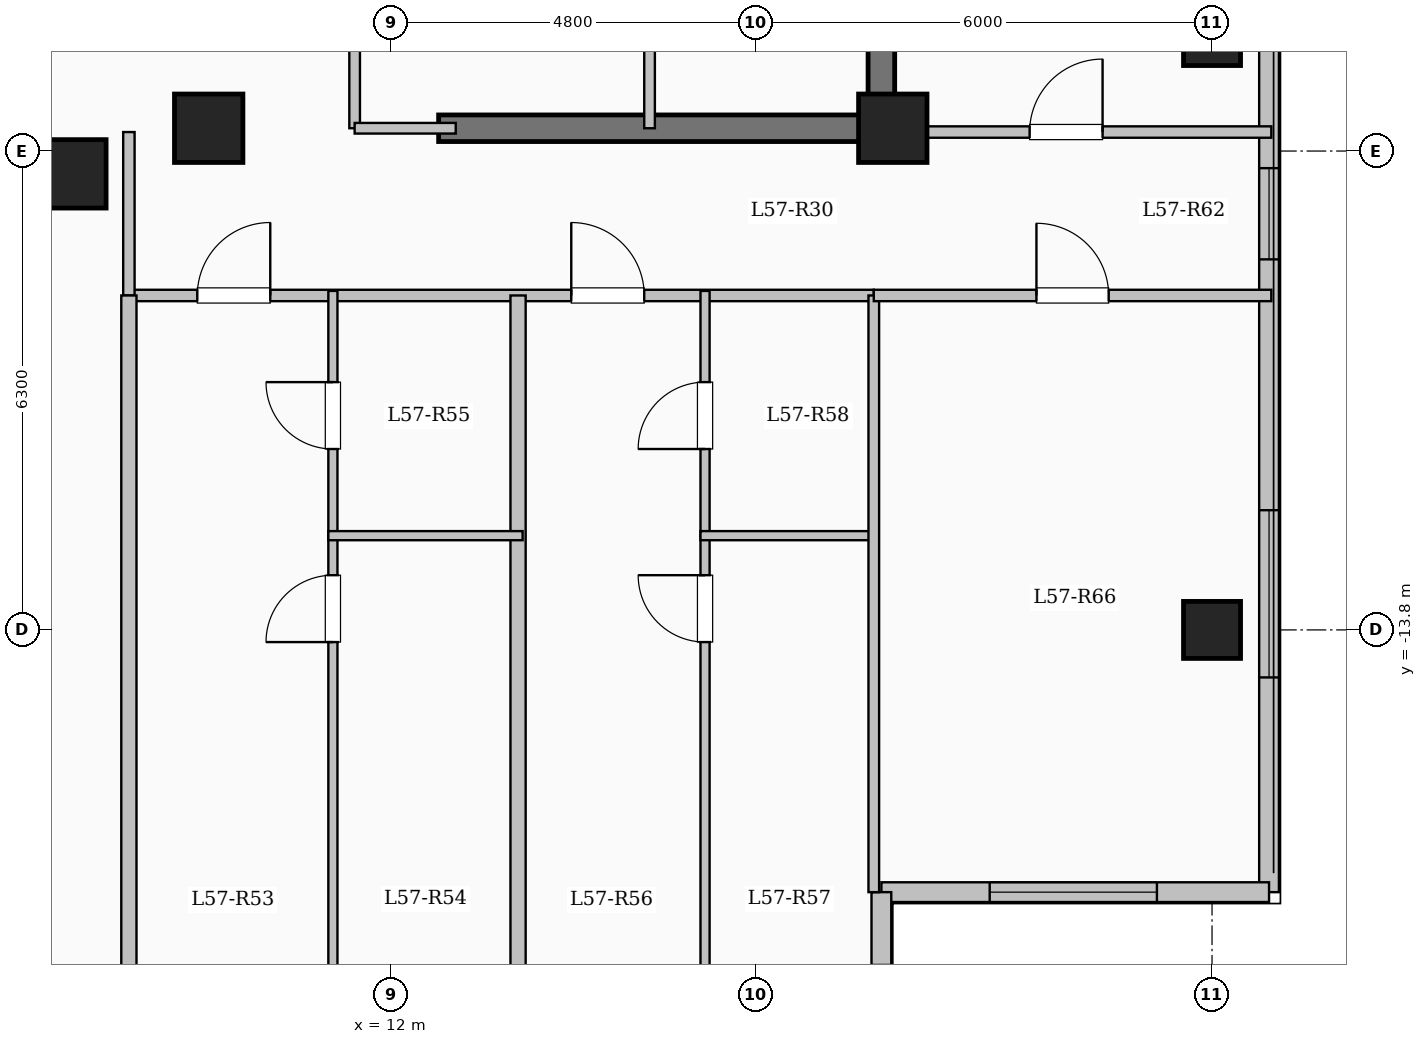
"""IFC4 building model, lengths in metres.
Left out: names, types, materials, properties, quantities, classifications, styles, units other than length and angle.
Written with IfcOpenShell. Run it as: python <this file> out.ifc"""

import sys

from ifc_helpers import new_model, si_unit, direction, frame, frame_2d, origin, origin_2d, place, context, subcontext, project, spatial, rectangle, extrude, element, fill, save


model = new_model("IFC4")
c1 = context("Model", 3, precision=1e-05, world=origin(), true_north=direction((0.0, 1.0)))
c2 = subcontext(c1, "Body", "Model", "MODEL_VIEW")
j1 = project(units=[si_unit("LENGTHUNIT", "METRE"), si_unit("PLANEANGLEUNIT", "RADIAN")], contexts=[c1])
p1 = place(None, origin())
s1 = spatial("IfcSite", under=j1, at=p1, CompositionType="ELEMENT")
p2 = place(p1, origin())
s2 = spatial("IfcBuilding", under=s1, at=p2, CompositionType="ELEMENT")
p3 = place(p2, frame((0.0, 0.0, 210.35)))
s3 = spatial("IfcBuildingStorey", under=s2, at=p3, CompositionType="ELEMENT", Elevation=210.35)
for number, where, z_axis, x_axis in (
    (1, (7.8, -7.8, 0.0), (0.0, 0.0, 1.0), (1.0, 0.0, 0.0)),
    (2, (9.6, -7.2, 0.0), (0.0, 0.0, 1.0), (1.0, 0.0, 0.0)),
    (3, (18.6, -7.2, 0.0), (0.0, 0.0, 1.0), (1.0, 0.0, 0.0)),
):
    element("IfcColumn", number, at=place(p3, frame(where, z_axis=z_axis, x_axis=x_axis)), inside=s3, PredefinedType="COLUMN", context=c2, shape_type="SweptSolid", body=[
        extrude(rectangle(XDim=0.9, YDim=0.9, at=origin_2d()), origin(), (0.0, 0.0, 1.0), 3.35),
    ])
for number, where, z_axis, x_axis in (
    (4, (22.8, -13.8, 0.0), (0.0, 0.0, 1.0), (1.0, 0.0, 0.0)),
    (5, (22.8, -6.0, 0.0), (0.0, 0.0, 1.0), (1.0, 0.0, 0.0)),
):
    element("IfcColumn", number, at=place(p3, frame(where, z_axis=z_axis, x_axis=x_axis)), inside=s3, PredefinedType="COLUMN", context=c2, shape_type="SweptSolid", body=[
        extrude(rectangle(XDim=0.75, YDim=0.75, at=origin_2d()), origin(), (0.0, 0.0, 1.0), 3.35),
    ])
p4 = place(p3, frame((23.55, 17.25, 0.0), z_axis=(0.0, 0.0, 1.0), x_axis=(0.0, -1.0, 0.0)))
e6 = element("IfcWall", 6, at=p4, inside=s3, PredefinedType="SOLIDWALL", context=c2, shape_type="SweptSolid", body=[
    extrude(rectangle(XDim=34.5, YDim=0.26, at=frame_2d((17.25, 0.0))), origin(), (0.0, 0.0, 1.0), 3.1),
])
p5 = place(p4, frame((1.375, 0.0, 0.9)))
e7 = element("IfcOpeningElement", 7, at=p5, cuts=e6, PredefinedType="OPENING", context=c2, shape_type="SweptSolid", body=[
    extrude(rectangle(XDim=2.0, YDim=1.7, at=frame_2d((1.0, 0.85))), frame((0.0, 0.14, 0.0), z_axis=(0.0, -1.0, 0.0), x_axis=(1.0, 0.0, 0.0)), (0.0, 0.0, 1.0), 0.28),
])
p6 = place(p4, frame((5.125, 0.0, 0.95)))
e8 = element("IfcOpeningElement", 8, at=p6, cuts=e6, PredefinedType="OPENING", context=c2, shape_type="SweptSolid", body=[
    extrude(rectangle(XDim=1.0, YDim=1.5, at=frame_2d((0.5, 0.75))), frame((0.0, 0.14, 0.0), z_axis=(0.0, -1.0, 0.0), x_axis=(1.0, 0.0, 0.0)), (0.0, 0.0, 1.0), 0.28),
])
p7 = place(p4, frame((8.375, 0.0, 0.9)))
e9 = element("IfcOpeningElement", 9, at=p7, cuts=e6, PredefinedType="OPENING", context=c2, shape_type="SweptSolid", body=[
    extrude(rectangle(XDim=2.0, YDim=1.7, at=frame_2d((1.0, 0.85))), frame((0.0, 0.14, 0.0), z_axis=(0.0, -1.0, 0.0), x_axis=(1.0, 0.0, 0.0)), (0.0, 0.0, 1.0), 0.28),
])
p8 = place(p4, frame((13.2, 0.0, 0.9)))
e10 = element("IfcOpeningElement", 10, at=p8, cuts=e6, PredefinedType="OPENING", context=c2, shape_type="SweptSolid", body=[
    extrude(rectangle(XDim=1.65, YDim=1.6, at=frame_2d((0.825, 0.8))), frame((0.0, 0.14, 0.0), z_axis=(0.0, -1.0, 0.0), x_axis=(1.0, 0.0, 0.0)), (0.0, 0.0, 1.0), 0.28),
])
p9 = place(p4, frame((19.05, 0.0, 0.9)))
e11 = element("IfcOpeningElement", 11, at=p9, cuts=e6, PredefinedType="OPENING", context=c2, shape_type="SweptSolid", body=[
    extrude(rectangle(XDim=2.2, YDim=1.75, at=frame_2d((1.1, 0.875))), frame((0.0, 0.14, 0.0), z_axis=(0.0, -1.0, 0.0), x_axis=(1.0, 0.0, 0.0)), (0.0, 0.0, 1.0), 0.28),
])
p10 = place(p4, frame((24.975, 0.0, 0.95)))
e12 = element("IfcOpeningElement", 12, at=p10, cuts=e6, PredefinedType="OPENING", context=c2, shape_type="SweptSolid", body=[
    extrude(rectangle(XDim=1.2, YDim=1.5, at=frame_2d((0.6, 0.75))), frame((0.0, 0.14, 0.0), z_axis=(0.0, -1.0, 0.0), x_axis=(1.0, 0.0, 0.0)), (0.0, 0.0, 1.0), 0.28),
])
p11 = place(p4, frame((29.475, 0.0, 0.9)))
e13 = element("IfcOpeningElement", 13, at=p11, cuts=e6, PredefinedType="OPENING", context=c2, shape_type="SweptSolid", body=[
    extrude(rectangle(XDim=2.2, YDim=1.75, at=frame_2d((1.1, 0.875))), frame((0.0, 0.14, 0.0), z_axis=(0.0, -1.0, 0.0), x_axis=(1.0, 0.0, 0.0)), (0.0, 0.0, 1.0), 0.28),
])
p12 = place(p3, frame((23.55, -17.25, 0.0), z_axis=(0.0, 0.0, 1.0), x_axis=(-1.0, 0.0, 0.0)))
e14 = element("IfcWall", 14, at=p12, inside=s3, PredefinedType="SOLIDWALL", context=c2, shape_type="SweptSolid", body=[
    extrude(rectangle(XDim=5.1, YDim=0.26, at=frame_2d((2.55, 0.0))), origin(), (0.0, 0.0, 1.0), 3.1),
])
p13 = place(p12, frame((1.475, 0.0, 0.9)))
e15 = element("IfcOpeningElement", 15, at=p13, cuts=e14, PredefinedType="OPENING", context=c2, shape_type="SweptSolid", body=[
    extrude(rectangle(XDim=2.2, YDim=1.75, at=frame_2d((1.1, 0.875))), frame((0.0, 0.14, 0.0), z_axis=(0.0, -1.0, 0.0), x_axis=(1.0, 0.0, 0.0)), (0.0, 0.0, 1.0), 0.28),
])
p14 = place(p3, frame((18.45, -17.25, 0.0), z_axis=(0.0, 0.0, 1.0), x_axis=(0.0, -1.0, 0.0)))
e16 = element("IfcWall", 16, at=p14, inside=s3, PredefinedType="SOLIDWALL", context=c2, shape_type="SweptSolid", body=[
    extrude(rectangle(XDim=3.6, YDim=0.26, at=frame_2d((1.8, 0.0))), origin(), (0.0, 0.0, 1.0), 3.1),
])
p15 = place(p14, frame((0.958, 0.0, 0.9)))
e17 = element("IfcOpeningElement", 17, at=p15, cuts=e16, PredefinedType="OPENING", context=c2, shape_type="SweptSolid", body=[
    extrude(rectangle(XDim=1.65, YDim=1.6, at=frame_2d((0.825, 0.8))), frame((0.0, 0.14, 0.0), z_axis=(0.0, -1.0, 0.0), x_axis=(1.0, 0.0, 0.0)), (0.0, 0.0, 1.0), 0.28),
])
p16 = place(p3, frame((18.45, -7.375, 0.0), z_axis=(0.0, 0.0, 1.0), x_axis=(0.0, 1.0, 0.0)))
e18 = element("IfcWall", 18, at=p16, inside=s3, PredefinedType="SHEAR", context=c2, shape_type="SweptSolid", body=[
    extrude(rectangle(XDim=14.05, YDim=0.35, at=frame_2d((7.025, 0.0))), origin(), (0.0, 0.0, 1.0), 3.35),
])
p17 = place(p3, frame((12.625, -7.2, 0.0), z_axis=(0.0, 0.0, 1.0), x_axis=(1.0, 0.0, 0.0)))
e19 = element("IfcWall", 19, at=p17, inside=s3, PredefinedType="SHEAR", context=c2, shape_type="SweptSolid", body=[
    extrude(rectangle(XDim=6.0, YDim=0.35, at=frame_2d((3.0, 0.0))), origin(), (0.0, 0.0, 1.0), 3.35),
])
p18 = place(p3, frame((15.4, -7.2, 0.0), z_axis=(0.0, 0.0, 1.0), x_axis=(0.0, 1.0, 0.0)))
e20 = element("IfcWall", 20, at=p18, inside=s3, PredefinedType="PARTITIONING", context=c2, shape_type="SweptSolid", body=[
    extrude(rectangle(XDim=10.45, YDim=0.14, at=frame_2d((5.225, 0.0))), origin(), (0.0, 0.0, 1.0), 3.1),
])
p19 = place(p18, frame((9.25, 0.0, 0.0)))
e21 = element("IfcOpeningElement", 21, at=p19, cuts=e20, PredefinedType="OPENING", context=c2, shape_type="SweptSolid", body=[
    extrude(rectangle(XDim=0.9, YDim=2.08, at=frame_2d((0.45, 1.04))), frame((0.0, 0.08, 0.0), z_axis=(0.0, -1.0, 0.0), x_axis=(1.0, 0.0, 0.0)), (0.0, 0.0, 1.0), 0.16),
])
p20 = place(p3, frame((11.52, -7.2, 0.0), z_axis=(0.0, 0.0, 1.0), x_axis=(0.0, 1.0, 0.0)))
e22 = element("IfcWall", 22, at=p20, inside=s3, PredefinedType="PARTITIONING", context=c2, shape_type="SweptSolid", body=[
    extrude(rectangle(XDim=9.12, YDim=0.14, at=frame_2d((4.56, 0.0))), origin(), (0.0, 0.0, 1.0), 3.1),
])
p21 = place(p20, frame((3.8, 0.0, 0.0)))
e23 = element("IfcOpeningElement", 23, at=p21, cuts=e22, PredefinedType="OPENING", context=c2, shape_type="SweptSolid", body=[
    extrude(rectangle(XDim=0.9, YDim=2.08, at=frame_2d((0.45, 1.04))), frame((0.0, 0.08, 0.0), z_axis=(0.0, -1.0, 0.0), x_axis=(1.0, 0.0, 0.0)), (0.0, 0.0, 1.0), 0.16),
])
p22 = place(p3, frame((11.52, -7.2, 0.0), z_axis=(0.0, 0.0, 1.0), x_axis=(1.0, 0.0, 0.0)))
e24 = element("IfcWall", 24, at=p22, inside=s3, PredefinedType="PARTITIONING", context=c2, shape_type="SweptSolid", body=[
    extrude(rectangle(XDim=1.33, YDim=0.14, at=frame_2d((0.665, 0.0))), origin(), (0.0, 0.0, 1.0), 2.235),
])
p23 = place(p3, frame((8.55, -9.4, 0.0), z_axis=(0.0, 0.0, 1.0), x_axis=(1.0, 0.0, 0.0)))
e25 = element("IfcWall", 25, at=p23, inside=s3, PredefinedType="PARTITIONING", context=c2, shape_type="SweptSolid", body=[
    extrude(rectangle(XDim=9.8, YDim=0.15, at=frame_2d((4.9, 0.0))), origin(), (0.0, 0.0, 1.0), 3.1),
])
p24 = place(p23, frame((0.9, 0.0, 0.0)))
e26 = element("IfcOpeningElement", 26, at=p24, cuts=e25, PredefinedType="OPENING", context=c2, shape_type="SweptSolid", body=[
    extrude(rectangle(XDim=0.96, YDim=2.15, at=frame_2d((0.48, 1.075))), frame((0.0, 0.085, 0.0), z_axis=(0.0, -1.0, 0.0), x_axis=(1.0, 0.0, 0.0)), (0.0, 0.0, 1.0), 0.17),
])
p25 = place(p23, frame((5.82, 0.0, 0.0)))
e27 = element("IfcOpeningElement", 27, at=p25, cuts=e25, PredefinedType="OPENING", context=c2, shape_type="SweptSolid", body=[
    extrude(rectangle(XDim=0.96, YDim=2.15, at=frame_2d((0.48, 1.075))), frame((0.0, 0.085, 0.0), z_axis=(0.0, -1.0, 0.0), x_axis=(1.0, 0.0, 0.0)), (0.0, 0.0, 1.0), 0.17),
])
p26 = place(p3, frame((8.55, -9.4, 0.0), z_axis=(0.0, 0.0, 1.0), x_axis=(0.0, 1.0, 0.0)))
e28 = element("IfcWall", 28, at=p26, inside=s3, PredefinedType="PARTITIONING", context=c2, shape_type="SweptSolid", body=[
    extrude(rectangle(XDim=2.15, YDim=0.15, at=frame_2d((1.075, 0.0))), origin(), (0.0, 0.0, 1.0), 3.1),
])
p27 = place(p3, frame((13.67, -20.9, 0.0), z_axis=(0.0, 0.0, 1.0), x_axis=(0.0, 1.0, 0.0)))
e29 = element("IfcWall", 29, at=p27, inside=s3, PredefinedType="SOLIDWALL", context=c2, shape_type="SweptSolid", body=[
    extrude(rectangle(XDim=11.5, YDim=0.2, at=frame_2d((5.75, 0.0))), origin(), (0.0, 0.0, 1.0), 3.1),
])
p28 = place(p3, frame((11.234, -20.9, 0.0), z_axis=(0.0, 0.0, 1.0), x_axis=(0.0, 1.0, 0.0)))
e30 = element("IfcWall", 30, at=p28, inside=s3, PredefinedType="PARTITIONING", context=c2, shape_type="SweptSolid", body=[
    extrude(rectangle(XDim=8.34, YDim=0.12, at=frame_2d((4.17, 0.0))), origin(), (0.0, 0.0, 1.0), 3.1),
])
p29 = place(p28, frame((6.94, 0.0, 0.0)))
e31 = element("IfcOpeningElement", 31, at=p29, cuts=e30, PredefinedType="OPENING", context=c2, shape_type="SweptSolid", body=[
    extrude(rectangle(XDim=0.88, YDim=2.1, at=frame_2d((0.44, 1.05))), frame((0.0, 0.07, 0.0), z_axis=(0.0, -1.0, 0.0), x_axis=(1.0, 0.0, 0.0)), (0.0, 0.0, 1.0), 0.14),
])
p30 = place(p3, frame((11.234, -12.56, 0.0), z_axis=(0.0, 0.0, 1.0), x_axis=(0.0, 1.0, 0.0)))
e32 = element("IfcWall", 32, at=p30, inside=s3, PredefinedType="PARTITIONING", context=c2, shape_type="SweptSolid", body=[
    extrude(rectangle(XDim=3.22, YDim=0.12, at=frame_2d((1.61, 0.0))), origin(), (0.0, 0.0, 1.0), 3.1),
])
p31 = place(p30, frame((1.14, 0.0, 0.0)))
e33 = element("IfcOpeningElement", 33, at=p31, cuts=e32, PredefinedType="OPENING", context=c2, shape_type="SweptSolid", body=[
    extrude(rectangle(XDim=0.88, YDim=2.1, at=frame_2d((0.44, 1.05))), frame((0.0, 0.07, 0.0), z_axis=(0.0, -1.0, 0.0), x_axis=(1.0, 0.0, 0.0)), (0.0, 0.0, 1.0), 0.14),
])
p32 = place(p3, frame((11.174, -12.56, 0.0), z_axis=(0.0, 0.0, 1.0), x_axis=(1.0, 0.0, 0.0)))
e34 = element("IfcWall", 34, at=p32, inside=s3, PredefinedType="PARTITIONING", context=c2, shape_type="SweptSolid", body=[
    extrude(rectangle(XDim=2.556, YDim=0.12, at=frame_2d((1.278, 0.0))), origin(), (0.0, 0.0, 1.0), 2.725),
])
p33 = place(p3, frame((16.13, -20.9, 0.0), z_axis=(0.0, 0.0, 1.0), x_axis=(0.0, 1.0, 0.0)))
e35 = element("IfcWall", 35, at=p33, inside=s3, PredefinedType="PARTITIONING", context=c2, shape_type="SweptSolid", body=[
    extrude(rectangle(XDim=8.34, YDim=0.12, at=frame_2d((4.17, 0.0))), origin(), (0.0, 0.0, 1.0), 3.1),
])
p34 = place(p33, frame((6.94, 0.0, 0.0)))
e36 = element("IfcOpeningElement", 36, at=p34, cuts=e35, PredefinedType="OPENING", context=c2, shape_type="SweptSolid", body=[
    extrude(rectangle(XDim=0.88, YDim=2.1, at=frame_2d((0.44, 1.05))), frame((0.0, 0.07, 0.0), z_axis=(0.0, -1.0, 0.0), x_axis=(1.0, 0.0, 0.0)), (0.0, 0.0, 1.0), 0.14),
])
p35 = place(p3, frame((16.13, -12.56, 0.0), z_axis=(0.0, 0.0, 1.0), x_axis=(0.0, 1.0, 0.0)))
e37 = element("IfcWall", 37, at=p35, inside=s3, PredefinedType="PARTITIONING", context=c2, shape_type="SweptSolid", body=[
    extrude(rectangle(XDim=3.22, YDim=0.12, at=frame_2d((1.61, 0.0))), origin(), (0.0, 0.0, 1.0), 3.1),
])
p36 = place(p35, frame((1.14, 0.0, 0.0)))
e38 = element("IfcOpeningElement", 38, at=p36, cuts=e37, PredefinedType="OPENING", context=c2, shape_type="SweptSolid", body=[
    extrude(rectangle(XDim=0.88, YDim=2.1, at=frame_2d((0.44, 1.05))), frame((0.0, 0.07, 0.0), z_axis=(0.0, -1.0, 0.0), x_axis=(1.0, 0.0, 0.0)), (0.0, 0.0, 1.0), 0.14),
])
p37 = place(p3, frame((16.07, -12.56, 0.0), z_axis=(0.0, 0.0, 1.0), x_axis=(1.0, 0.0, 0.0)))
e39 = element("IfcWall", 39, at=p37, inside=s3, PredefinedType="PARTITIONING", context=c2, shape_type="SweptSolid", body=[
    extrude(rectangle(XDim=2.34, YDim=0.12, at=frame_2d((1.17, 0.0))), origin(), (0.0, 0.0, 1.0), 3.1),
])
p38 = place(p3, frame((8.55, -21.504, 0.0), z_axis=(0.0, 0.0, 1.0), x_axis=(0.0, 1.0, 0.0)))
e40 = element("IfcWall", 40, at=p38, inside=s3, PredefinedType="SOLIDWALL", context=c2, shape_type="SweptSolid", body=[
    extrude(rectangle(XDim=12.104, YDim=0.2, at=frame_2d((6.052, 0.0))), origin(), (0.0, 0.0, 1.0), 3.1),
])
p39 = place(p3, frame((18.45, -7.25, 0.0), z_axis=(0.0, 0.0, 1.0), x_axis=(1.0, 0.0, 0.0)))
e41 = element("IfcWall", 41, at=p39, inside=s3, PredefinedType="PARTITIONING", context=c2, shape_type="SweptSolid", body=[
    extrude(rectangle(XDim=5.13, YDim=0.15, at=frame_2d((2.565, 0.0))), origin(), (0.0, 0.0, 1.0), 3.1),
])
p40 = place(p39, frame((1.95, 0.0, 0.0)))
e42 = element("IfcOpeningElement", 42, at=p40, cuts=e41, PredefinedType="OPENING", context=c2, shape_type="SweptSolid", body=[
    extrude(rectangle(XDim=0.96, YDim=2.15, at=frame_2d((0.48, 1.075))), frame((0.0, 0.085, 0.0), z_axis=(0.0, -1.0, 0.0), x_axis=(1.0, 0.0, 0.0)), (0.0, 0.0, 1.0), 0.17),
])
p41 = place(p3, frame((18.35, -17.25, 0.0), z_axis=(0.0, 0.0, 1.0), x_axis=(0.0, 1.0, 0.0)))
e43 = element("IfcWall", 43, at=p41, inside=s3, PredefinedType="PARTITIONING", context=c2, shape_type="SweptSolid", body=[
    extrude(rectangle(XDim=7.85, YDim=0.14, at=frame_2d((3.925, 0.0))), origin(), (0.0, 0.0, 1.0), 3.1),
])
p42 = place(p3, frame((18.35, -9.4, 0.0), z_axis=(0.0, 0.0, 1.0), x_axis=(1.0, 0.0, 0.0)))
e44 = element("IfcWall", 44, at=p42, inside=s3, PredefinedType="PARTITIONING", context=c2, shape_type="SweptSolid", body=[
    extrude(rectangle(XDim=5.23, YDim=0.15, at=frame_2d((2.615, 0.0))), origin(), (0.0, 0.0, 1.0), 3.1),
])
p43 = place(p42, frame((2.14, 0.0, 0.0)))
e45 = element("IfcOpeningElement", 45, at=p43, cuts=e44, PredefinedType="OPENING", context=c2, shape_type="SweptSolid", body=[
    extrude(rectangle(XDim=0.95, YDim=2.15, at=frame_2d((0.475, 1.075))), frame((0.0, 0.085, 0.0), z_axis=(0.0, -1.0, 0.0), x_axis=(1.0, 0.0, 0.0)), (0.0, 0.0, 1.0), 0.17),
])
p44 = place(p10, origin())
e46 = element("IfcWindow", 46, at=p44, inside=s3, PartitioningType="SINGLE_PANEL", PredefinedType="WINDOW", context=c2, shape_type="SweptSolid", body=[
    extrude(rectangle(XDim=1.2, YDim=1.5, at=frame_2d((0.6, 0.75))), frame((0.0, 0.03, 0.0), z_axis=(0.0, -1.0, 0.0), x_axis=(1.0, 0.0, 0.0)), (0.0, 0.0, 1.0), 0.06),
])
fill(e12, e46)
p45 = place(p11, origin())
e47 = element("IfcWindow", 47, at=p45, inside=s3, PartitioningType="SINGLE_PANEL", PredefinedType="WINDOW", context=c2, shape_type="SweptSolid", body=[
    extrude(rectangle(XDim=2.2, YDim=1.75, at=frame_2d((1.1, 0.875))), frame((0.0, 0.03, 0.0), z_axis=(0.0, -1.0, 0.0), x_axis=(1.0, 0.0, 0.0)), (0.0, 0.0, 1.0), 0.06),
])
fill(e13, e47)
p46 = place(p13, origin())
e48 = element("IfcWindow", 48, at=p46, inside=s3, PartitioningType="SINGLE_PANEL", PredefinedType="WINDOW", context=c2, shape_type="SweptSolid", body=[
    extrude(rectangle(XDim=2.2, YDim=1.75, at=frame_2d((1.1, 0.875))), frame((0.0, 0.03, 0.0), z_axis=(0.0, -1.0, 0.0), x_axis=(1.0, 0.0, 0.0)), (0.0, 0.0, 1.0), 0.06),
])
fill(e15, e48)
p47 = place(p24, origin())
e49 = element("IfcDoor", 49, at=p47, inside=s3, OperationType="SINGLE_SWING_RIGHT", PredefinedType="DOOR", context=c2, shape_type="SweptSolid", body=[
    extrude(rectangle(XDim=0.96, YDim=2.15, at=frame_2d((0.48, 1.075))), frame((0.0, 0.025, 0.0), z_axis=(0.0, -1.0, 0.0), x_axis=(1.0, 0.0, 0.0)), (0.0, 0.0, 1.0), 0.05),
])
fill(e26, e49)
p48 = place(p29, origin())
e50 = element("IfcDoor", 50, at=p48, inside=s3, OperationType="SINGLE_SWING_LEFT", PredefinedType="DOOR", context=c2, shape_type="SweptSolid", body=[
    extrude(rectangle(XDim=0.88, YDim=2.1, at=frame_2d((0.44, 1.05))), frame((0.0, 0.025, 0.0), z_axis=(0.0, -1.0, 0.0), x_axis=(1.0, 0.0, 0.0)), (0.0, 0.0, 1.0), 0.05),
])
fill(e31, e50)
p49 = place(p31, origin())
e51 = element("IfcDoor", 51, at=p49, inside=s3, OperationType="SINGLE_SWING_RIGHT", PredefinedType="DOOR", context=c2, shape_type="SweptSolid", body=[
    extrude(rectangle(XDim=0.88, YDim=2.1, at=frame_2d((0.44, 1.05))), frame((0.0, 0.025, 0.0), z_axis=(0.0, -1.0, 0.0), x_axis=(1.0, 0.0, 0.0)), (0.0, 0.0, 1.0), 0.05),
])
fill(e33, e51)
p50 = place(p25, origin())
e52 = element("IfcDoor", 52, at=p50, inside=s3, OperationType="SINGLE_SWING_LEFT", PredefinedType="DOOR", context=c2, shape_type="SweptSolid", body=[
    extrude(rectangle(XDim=0.96, YDim=2.15, at=frame_2d((0.48, 1.075))), frame((0.0, 0.025, 0.0), z_axis=(0.0, -1.0, 0.0), x_axis=(1.0, 0.0, 0.0)), (0.0, 0.0, 1.0), 0.05),
])
fill(e27, e52)
p51 = place(p34, origin())
e53 = element("IfcDoor", 53, at=p51, inside=s3, OperationType="SINGLE_SWING_RIGHT", PredefinedType="DOOR", context=c2, shape_type="SweptSolid", body=[
    extrude(rectangle(XDim=0.88, YDim=2.1, at=frame_2d((0.44, 1.05))), frame((0.0, 0.025, 0.0), z_axis=(0.0, -1.0, 0.0), x_axis=(1.0, 0.0, 0.0)), (0.0, 0.0, 1.0), 0.05),
])
fill(e36, e53)
p52 = place(p36, origin())
e54 = element("IfcDoor", 54, at=p52, inside=s3, OperationType="SINGLE_SWING_LEFT", PredefinedType="DOOR", context=c2, shape_type="SweptSolid", body=[
    extrude(rectangle(XDim=0.88, YDim=2.1, at=frame_2d((0.44, 1.05))), frame((0.0, 0.025, 0.0), z_axis=(0.0, -1.0, 0.0), x_axis=(1.0, 0.0, 0.0)), (0.0, 0.0, 1.0), 0.05),
])
fill(e38, e54)
p53 = place(p43, origin())
e55 = element("IfcDoor", 55, at=p53, inside=s3, OperationType="SINGLE_SWING_LEFT", PredefinedType="DOOR", context=c2, shape_type="SweptSolid", body=[
    extrude(rectangle(XDim=0.95, YDim=2.15, at=frame_2d((0.475, 1.075))), frame((0.0, 0.025, 0.0), z_axis=(0.0, -1.0, 0.0), x_axis=(1.0, 0.0, 0.0)), (0.0, 0.0, 1.0), 0.05),
])
fill(e45, e55)
p54 = place(p40, origin())
e56 = element("IfcDoor", 56, at=p54, inside=s3, OperationType="SINGLE_SWING_RIGHT", PredefinedType="DOOR", context=c2, shape_type="SweptSolid", body=[
    extrude(rectangle(XDim=0.96, YDim=2.15, at=frame_2d((0.48, 1.075))), frame((0.0, 0.025, 0.0), z_axis=(0.0, -1.0, 0.0), x_axis=(1.0, 0.0, 0.0)), (0.0, 0.0, 1.0), 0.05),
])
fill(e42, e56)
save(model, sys.argv[1])
